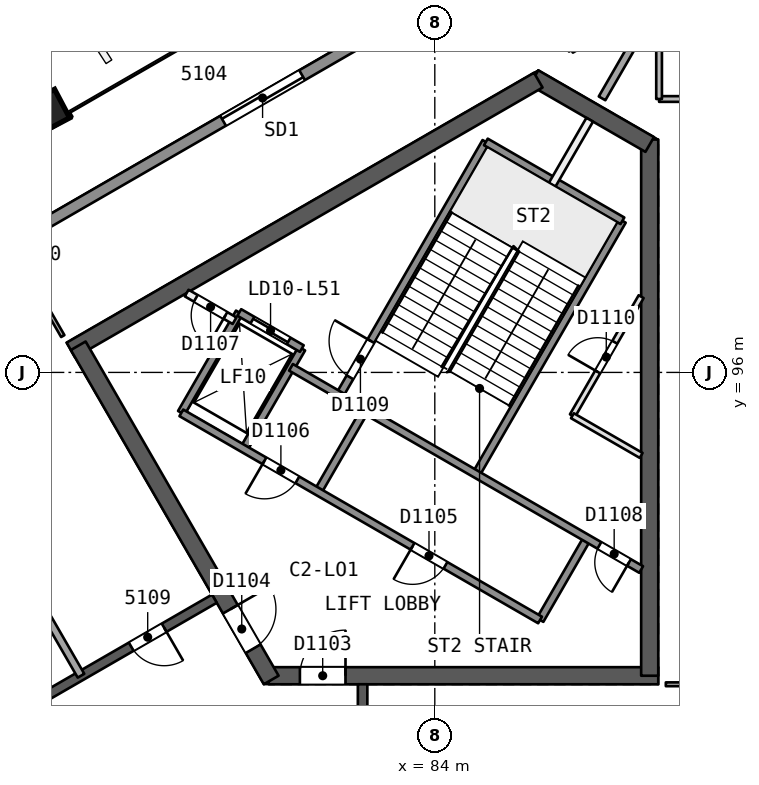
"""IFC4 building model, lengths in metres.
Left out: names, types, materials, properties, quantities, classifications, styles, units other than length and angle.
Written with IfcOpenShell. Run it as: python <this file> out.ifc"""

import sys

from ifc_helpers import new_model, si_unit, direction, frame, frame_2d, origin, origin_2d, place, context, subcontext, project, spatial, rectangle, extrude, element, fill, save


model = new_model("IFC4")
c1 = context("Model", 3, precision=1e-05, world=origin(), true_north=direction((0.0, 1.0)))
c2 = subcontext(c1, "Body", "Model", "MODEL_VIEW")
j1 = project(units=[si_unit("LENGTHUNIT", "METRE"), si_unit("PLANEANGLEUNIT", "RADIAN")], contexts=[c1])
p1 = place(None, origin())
s1 = spatial("IfcSite", under=j1, at=p1, CompositionType="ELEMENT")
p2 = place(p1, origin())
s2 = spatial("IfcBuilding", under=s1, at=p2, CompositionType="ELEMENT")
p3 = place(p2, frame((0.0, 0.0, 209.5)))
s3 = spatial("IfcBuildingStorey", under=s2, at=p3, CompositionType="ELEMENT", Elevation=209.5)
p4 = place(p3, frame((79.63, 88.019, 0.0), z_axis=(0.0, 0.0, 1.0), x_axis=(1.0, 0.0, 0.0)))
e1 = element("IfcWall", 1, at=p4, inside=s3, PredefinedType="SHEAR", context=c2, shape_type="SweptSolid", body=[
    extrude(rectangle(XDim=10.25, YDim=0.45, at=frame_2d((5.125, 0.0))), origin(), (0.0, 0.0, 1.0), 3.7),
])
p5 = place(p4, frame((0.82, 0.0, 0.0)))
e2 = element("IfcOpeningElement", 2, at=p5, cuts=e1, PredefinedType="OPENING", context=c2, shape_type="SweptSolid", body=[
    extrude(rectangle(XDim=1.2, YDim=2.1, at=frame_2d((0.6, 1.05))), frame((0.0, 0.235, 0.0), z_axis=(0.0, -1.0, 0.0), x_axis=(1.0, 0.0, 0.0)), (0.0, 0.0, 1.0), 0.471),
])
p6 = place(p3, frame((89.655, 88.019, 0.0), z_axis=(0.0, 0.0, 1.0), x_axis=(0.0, 1.0, 0.0)))
e3 = element("IfcWall", 3, at=p6, inside=s3, PredefinedType="SHEAR", context=c2, shape_type="SweptSolid", body=[
    extrude(rectangle(XDim=14.108, YDim=0.45, at=frame_2d((7.054, 0.0))), origin(), (0.0, 0.0, 1.0), 3.7),
])
p7 = place(p3, frame((89.655, 101.998, 0.0), z_axis=(0.0, 0.0, 1.0), x_axis=(-0.866042179588, 0.49997094233, 0.0)))
e4 = element("IfcWall", 4, at=p7, inside=s3, PredefinedType="SHEAR", context=c2, shape_type="SweptSolid", body=[
    extrude(rectangle(XDim=3.515, YDim=0.45, at=frame_2d((1.758, 0.0))), origin(), (0.0, 0.0, 1.0), 3.7),
])
p8 = place(p3, frame((86.723, 103.69, 0.0), z_axis=(0.0, 0.0, 1.0), x_axis=(-0.866022713978, -0.500004658852, 0.0)))
e5 = element("IfcWall", 5, at=p8, inside=s3, PredefinedType="SHEAR", context=c2, shape_type="SweptSolid", body=[
    extrude(rectangle(XDim=14.203, YDim=0.45, at=frame_2d((7.102, 0.0))), origin(), (0.0, 0.0, 1.0), 3.7),
])
p9 = place(p3, frame((74.617, 96.701, 0.0), z_axis=(0.0, 0.0, 1.0), x_axis=(0.499994385119, -0.866028645513, 0.0)))
e6 = element("IfcWall", 6, at=p9, inside=s3, PredefinedType="SHEAR", context=c2, shape_type="SweptSolid", body=[
    extrude(rectangle(XDim=10.155, YDim=0.45, at=frame_2d((5.077, 0.0))), origin(), (0.0, 0.0, 1.0), 3.7),
])
p10 = place(p9, frame((8.005, 0.0, 0.0)))
e7 = element("IfcOpeningElement", 7, at=p10, cuts=e6, PredefinedType="OPENING", context=c2, shape_type="SweptSolid", body=[
    extrude(rectangle(XDim=1.2, YDim=2.1, at=frame_2d((0.6, 1.05))), frame((0.0, 0.235, 0.0), z_axis=(0.0, -1.0, 0.0), x_axis=(1.0, 0.0, 0.0)), (0.0, 0.0, 1.0), 0.471),
])
p11 = place(p3, frame((82.1, 72.206, 0.0), z_axis=(0.0, 0.0, 1.0), x_axis=(0.0, 1.0, 0.0)))
e8 = element("IfcWall", 8, at=p11, inside=s3, PredefinedType="SHEAR", context=c2, shape_type="SweptSolid", body=[
    extrude(rectangle(XDim=15.588, YDim=0.25, at=frame_2d((7.794, 0.0))), origin(), (0.0, 0.0, 1.0), 3.3),
])
p12 = place(p11, frame((2.618, 0.0, 0.0)))
e9 = element("IfcOpeningElement", 9, at=p12, cuts=e8, PredefinedType="OPENING", context=c2, shape_type="SweptSolid", body=[
    extrude(rectangle(XDim=1.0, YDim=2.1, at=frame_2d((0.5, 1.05))), frame((0.0, 0.135, 0.0), z_axis=(0.0, -1.0, 0.0), x_axis=(1.0, 0.0, 0.0)), (0.0, 0.0, 1.0), 0.271),
])
p13 = place(p11, frame((8.627, 0.0, 0.0)))
e10 = element("IfcOpeningElement", 10, at=p13, cuts=e8, PredefinedType="OPENING", context=c2, shape_type="SweptSolid", body=[
    extrude(rectangle(XDim=1.1, YDim=2.1, at=frame_2d((0.55, 1.05))), frame((0.0, 0.135, 0.0), z_axis=(0.0, -1.0, 0.0), x_axis=(1.0, 0.0, 0.0)), (0.0, 0.0, 1.0), 0.271),
])
p14 = place(p11, frame((12.282, 0.0, 0.0)))
e11 = element("IfcOpeningElement", 11, at=p14, cuts=e8, PredefinedType="OPENING", context=c2, shape_type="SweptSolid", body=[
    extrude(rectangle(XDim=1.0, YDim=2.1, at=frame_2d((0.5, 1.05))), frame((0.0, 0.135, 0.0), z_axis=(0.0, -1.0, 0.0), x_axis=(1.0, 0.0, 0.0)), (0.0, 0.0, 1.0), 0.271),
])
p15 = place(p3, frame((78.2, 90.046, 0.0), z_axis=(0.0, 0.0, 1.0), x_axis=(-0.866026492143, -0.499998114903, 0.0)))
e12 = element("IfcWall", 12, at=p15, inside=s3, PredefinedType="SHEAR", context=c2, shape_type="SweptSolid", body=[
    extrude(rectangle(XDim=15.588, YDim=0.25, at=frame_2d((7.794, 0.0))), origin(), (0.0, 0.0, 1.0), 3.3),
])
p16 = place(p15, frame((1.527, 0.0, 0.0)))
e13 = element("IfcOpeningElement", 13, at=p16, cuts=e12, PredefinedType="OPENING", context=c2, shape_type="SweptSolid", body=[
    extrude(rectangle(XDim=1.0, YDim=2.1, at=frame_2d((0.5, 1.05))), frame((0.0, 0.135, 0.0), z_axis=(0.0, -1.0, 0.0), x_axis=(1.0, 0.0, 0.0)), (0.0, 0.0, 1.0), 0.271),
])
p17 = place(p15, frame((8.694, 0.0, 0.0)))
e14 = element("IfcOpeningElement", 14, at=p17, cuts=e12, PredefinedType="OPENING", context=c2, shape_type="SweptSolid", body=[
    extrude(rectangle(XDim=1.1, YDim=2.1, at=frame_2d((0.55, 1.05))), frame((0.0, 0.135, 0.0), z_axis=(0.0, -1.0, 0.0), x_axis=(1.0, 0.0, 0.0)), (0.0, 0.0, 1.0), 0.271),
])
p18 = place(p15, frame((13.062, 0.0, 0.0)))
e15 = element("IfcOpeningElement", 15, at=p18, cuts=e12, PredefinedType="OPENING", context=c2, shape_type="SweptSolid", body=[
    extrude(rectangle(XDim=1.0, YDim=2.1, at=frame_2d((0.5, 1.05))), frame((0.0, 0.135, 0.0), z_axis=(0.0, -1.0, 0.0), x_axis=(1.0, 0.0, 0.0)), (0.0, 0.0, 1.0), 0.271),
])
p19 = place(p3, frame((73.816, 102.902, 0.0), z_axis=(0.000857578916, -0.022824792675, 0.999739112668), x_axis=(0.866060437909, 0.499825470945, 0.010668480848)))
e16 = element("IfcColumn", 16, at=p19, inside=s3, PredefinedType="COLUMN", context=c2, shape_type="SweptSolid", body=[
    extrude(rectangle(XDim=0.85, YDim=0.85, at=origin_2d()), origin(), (0.0, 0.0, 1.0), 3.701),
])
p20 = place(p3, frame((92.727, 87.794, 0.0), z_axis=(0.0, 0.0, 1.0), x_axis=(-1.0, 0.0, 0.0)))
e17 = element("IfcWall", 17, at=p20, inside=s3, PredefinedType="PARTITIONING", context=c2, shape_type="SweptSolid", body=[
    extrude(rectangle(XDim=2.648, YDim=0.1, at=frame_2d((1.324, 0.0))), origin(), (0.0, 0.0, 1.0), 3.3),
])
p21 = place(p20, frame((0.874, 0.0, 0.0)))
e18 = element("IfcOpeningElement", 18, at=p21, cuts=e17, PredefinedType="OPENING", context=c2, shape_type="SweptSolid", body=[
    extrude(rectangle(XDim=0.9, YDim=2.1, at=frame_2d((0.45, 1.05))), frame((0.0, 0.061, 0.0), z_axis=(0.0, -1.0, 0.0), x_axis=(1.0, 0.0, 0.0)), (0.0, 0.0, 1.0), 0.121),
])
p22 = place(p3, frame((92.727, 103.194, 0.0), z_axis=(0.0, 0.0, 1.0), x_axis=(-1.0, 0.0, 0.0)))
e19 = element("IfcWall", 19, at=p22, inside=s3, PredefinedType="PARTITIONING", context=c2, shape_type="SweptSolid", body=[
    extrude(rectangle(XDim=2.825, YDim=0.15, at=frame_2d((1.413, 0.0))), origin(), (0.0, 0.0, 1.0), 3.3),
])
p23 = place(p22, frame((1.013, 0.0, 0.0)))
e20 = element("IfcOpeningElement", 20, at=p23, cuts=e19, PredefinedType="OPENING", context=c2, shape_type="SweptSolid", body=[
    extrude(rectangle(XDim=0.8, YDim=2.1, at=frame_2d((0.4, 1.05))), frame((0.0, 0.085, 0.0), z_axis=(0.0, -1.0, 0.0), x_axis=(1.0, 0.0, 0.0)), (0.0, 0.0, 1.0), 0.171),
])
p24 = place(p3, frame((89.902, 103.194, 0.0), z_axis=(0.0, 0.0, 1.0), x_axis=(0.0, 1.0, 0.0)))
e21 = element("IfcWall", 21, at=p24, inside=s3, PredefinedType="PARTITIONING", context=c2, shape_type="SweptSolid", body=[
    extrude(rectangle(XDim=2.6, YDim=0.15, at=frame_2d((1.3, 0.0))), origin(), (0.0, 0.0, 1.0), 3.3),
])
p25 = place(p3, frame((90.524, 106.889, 0.0), z_axis=(0.0, 0.0, 1.0), x_axis=(-0.499991184371, -0.86603049343, 0.0)))
e22 = element("IfcWall", 22, at=p25, inside=s3, PredefinedType="PARTITIONING", context=c2, shape_type="SweptSolid", body=[
    extrude(rectangle(XDim=4.247, YDim=0.2, at=frame_2d((2.123, 0.0))), origin(), (0.0, 0.0, 1.0), 3.3),
])
p26 = place(p3, frame((74.21, 96.956, 0.0), z_axis=(0.0, 0.0, 1.0), x_axis=(-0.49995654735, 0.86605048973, 0.0)))
e23 = element("IfcWall", 23, at=p26, inside=s3, PredefinedType="PARTITIONING", context=c2, shape_type="SweptSolid", body=[
    extrude(rectangle(XDim=2.648, YDim=0.1, at=frame_2d((1.324, 0.0))), origin(), (0.0, 0.0, 1.0), 3.3),
])
p27 = place(p26, frame((0.874, 0.0, 0.0)))
e24 = element("IfcOpeningElement", 24, at=p27, cuts=e23, PredefinedType="OPENING", context=c2, shape_type="SweptSolid", body=[
    extrude(rectangle(XDim=0.9, YDim=2.1, at=frame_2d((0.45, 1.05))), frame((0.0, 0.061, 0.0), z_axis=(0.0, -1.0, 0.0), x_axis=(1.0, 0.0, 0.0)), (0.0, 0.0, 1.0), 0.121),
])
p28 = place(p3, frame((69.376, 97.223, 0.0), z_axis=(0.0, 0.0, 1.0), x_axis=(0.499993571489, -0.866029115255, 0.0)))
e25 = element("IfcWall", 25, at=p28, inside=s3, PredefinedType="PARTITIONING", context=c2, shape_type="SweptSolid", body=[
    extrude(rectangle(XDim=10.627, YDim=0.2, at=frame_2d((5.313, 0.0))), origin(), (0.0, 0.0, 1.0), 3.3),
])
p29 = place(p3, frame((89.848, 105.779, 0.0), z_axis=(0.0, 0.0, 1.0), x_axis=(-0.866021400173, -0.500006934395, 0.0)))
e26 = element("IfcWall", 26, at=p29, inside=s3, PredefinedType="PARTITIONING", context=c2, shape_type="SweptSolid", body=[
    extrude(rectangle(XDim=2.6, YDim=0.15, at=frame_2d((1.3, 0.0))), origin(), (0.0, 0.0, 1.0), 3.3),
])
p30 = place(p3, frame((43.802, 82.63, 0.0), z_axis=(0.0, 0.0, 1.0), x_axis=(0.866026224187, 0.499998579018, 0.0)))
e27 = element("IfcWall", 27, at=p30, inside=s3, PredefinedType="SOLIDWALL", context=c2, shape_type="SweptSolid", body=[
    extrude(rectangle(XDim=51.406, YDim=0.3, at=frame_2d((25.703, 0.0))), origin(), (0.0, 0.0, 1.0), 3.3),
])
p31 = place(p30, frame((24.503, 0.0, 0.0)))
e28 = element("IfcOpeningElement", 28, at=p31, cuts=e27, PredefinedType="OPENING", context=c2, shape_type="SweptSolid", body=[
    extrude(rectangle(XDim=2.4, YDim=2.4, at=frame_2d((1.2, 1.2))), frame((0.0, 0.161, 0.0), z_axis=(0.0, -1.0, 0.0), x_axis=(1.0, 0.0, 0.0)), (0.0, 0.0, 1.0), 0.321),
])
p32 = place(p30, frame((30.271, 0.0, 0.0)))
e29 = element("IfcOpeningElement", 29, at=p32, cuts=e27, PredefinedType="OPENING", context=c2, shape_type="SweptSolid", body=[
    extrude(rectangle(XDim=2.4, YDim=2.4, at=frame_2d((1.2, 1.2))), frame((0.0, 0.161, 0.0), z_axis=(0.0, -1.0, 0.0), x_axis=(1.0, 0.0, 0.0)), (0.0, 0.0, 1.0), 0.321),
])
p33 = place(p30, frame((39.983, 0.0, 0.0)))
e30 = element("IfcOpeningElement", 30, at=p33, cuts=e27, PredefinedType="OPENING", context=c2, shape_type="SweptSolid", body=[
    extrude(rectangle(XDim=2.4, YDim=2.4, at=frame_2d((1.2, 1.2))), frame((0.0, 0.161, 0.0), z_axis=(0.0, -1.0, 0.0), x_axis=(1.0, 0.0, 0.0)), (0.0, 0.0, 1.0), 0.321),
])
p34 = place(p30, frame((18.736, 0.0, 0.0)))
e31 = element("IfcOpeningElement", 31, at=p34, cuts=e27, PredefinedType="OPENING", context=c2, shape_type="SweptSolid", body=[
    extrude(rectangle(XDim=2.4, YDim=2.4, at=frame_2d((1.2, 1.2))), frame((0.0, 0.161, 0.0), z_axis=(0.0, -1.0, 0.0), x_axis=(1.0, 0.0, 0.0)), (0.0, 0.0, 1.0), 0.321),
])
p35 = place(p30, frame((9.0, 0.0, 0.0)))
e32 = element("IfcOpeningElement", 32, at=p35, cuts=e27, PredefinedType="OPENING", context=c2, shape_type="SweptSolid", body=[
    extrude(rectangle(XDim=2.4, YDim=2.4, at=frame_2d((1.2, 1.2))), frame((0.0, 0.161, 0.0), z_axis=(0.0, -1.0, 0.0), x_axis=(1.0, 0.0, 0.0)), (0.0, 0.0, 1.0), 0.321),
])
p36 = place(p3, frame((86.77, 89.486, 0.0), z_axis=(0.0, 0.0, 1.0), x_axis=(0.499961042966, 0.86604789447, 0.0)))
e33 = element("IfcWall", 33, at=p36, inside=s3, PredefinedType="SOLIDWALL", context=c2, shape_type="SweptSolid", body=[
    extrude(rectangle(XDim=2.48, YDim=0.2, at=frame_2d((1.24, 0.0))), origin(), (0.0, 0.0, 1.0), 3.3),
])
p37 = place(p3, frame((87.621, 94.86, 0.0), z_axis=(0.0, 0.0, 1.0), x_axis=(0.499993116331, 0.866029378036, 0.0)))
e34 = element("IfcWall", 34, at=p37, inside=s3, PredefinedType="PARTITIONING", context=c2, shape_type="SweptSolid", body=[
    extrude(rectangle(XDim=3.618, YDim=0.15, at=frame_2d((1.809, 0.0))), origin(), (0.0, 0.0, 1.0), 3.3),
])
p38 = place(p37, frame((1.332, 0.0, 0.0)))
e35 = element("IfcOpeningElement", 35, at=p38, cuts=e34, PredefinedType="OPENING", context=c2, shape_type="SweptSolid", body=[
    extrude(rectangle(XDim=0.9, YDim=2.1, at=frame_2d((0.45, 1.05))), frame((0.0, 0.085, 0.0), z_axis=(0.0, -1.0, 0.0), x_axis=(1.0, 0.0, 0.0)), (0.0, 0.0, 1.0), 0.171),
])
p39 = place(p3, frame((85.087, 93.321, 0.0), z_axis=(0.0, 0.0, 1.0), x_axis=(0.500019787375, 0.866013979237, 0.0)))
e36 = element("IfcWall", 36, at=p39, inside=s3, PredefinedType="SOLIDWALL", context=c2, shape_type="SweptSolid", body=[
    extrude(rectangle(XDim=7.7, YDim=0.2, at=frame_2d((3.85, 0.0))), origin(), (0.0, 0.0, 1.0), 3.3),
])
p40 = place(p3, frame((87.09, 100.94, 0.0), z_axis=(0.0, 0.0, 1.0), x_axis=(0.500011643316, 0.866018681408, 0.0)))
e37 = element("IfcWall", 37, at=p40, inside=s3, PredefinedType="PARTITIONING", context=c2, shape_type="SweptSolid", body=[
    extrude(rectangle(XDim=1.973, YDim=0.2, at=frame_2d((0.987, 0.0))), origin(), (0.0, 0.0, 1.0), 3.3),
])
p41 = place(p3, frame((80.924, 92.861, 0.0), z_axis=(0.0, 0.0, 1.0), x_axis=(0.499961042966, 0.86604789447, 0.0)))
e38 = element("IfcWall", 38, at=p41, inside=s3, PredefinedType="SOLIDWALL", context=c2, shape_type="SweptSolid", body=[
    extrude(rectangle(XDim=2.48, YDim=0.2, at=frame_2d((1.24, 0.0))), origin(), (0.0, 0.0, 1.0), 3.3),
])
p42 = place(p3, frame((81.493, 95.396, 0.0), z_axis=(0.0, 0.0, 1.0), x_axis=(0.500006057782, 0.866021906294, 0.0)))
e39 = element("IfcWall", 39, at=p42, inside=s3, PredefinedType="SOLIDWALL", context=c2, shape_type="SweptSolid", body=[
    extrude(rectangle(XDim=7.7, YDim=0.2, at=frame_2d((3.85, 0.0))), origin(), (0.0, 0.0, 1.0), 3.3),
])
p43 = place(p42, frame((0.55, 0.0, 0.0)))
e40 = element("IfcOpeningElement", 40, at=p43, cuts=e39, PredefinedType="OPENING", context=c2, shape_type="SweptSolid", body=[
    extrude(rectangle(XDim=1.1, YDim=2.1, at=frame_2d((0.55, 1.05))), frame((0.0, 0.11, 0.0), z_axis=(0.0, -1.0, 0.0), x_axis=(1.0, 0.0, 0.0)), (0.0, 0.0, 1.0), 0.221),
])
for number, where, z_axis, x_axis in (
    (41, (78.976, 93.986, 0.0), (0.0, 0.0, 1.0), (0.5, 0.866, 0.0)),
    (42, (77.33, 94.936, 0.0), (0.0, 0.0, 1.0), (0.5, 0.866, 0.0)),
):
    element("IfcWall", number, at=place(p3, frame(where, z_axis=z_axis, x_axis=x_axis)), inside=s3, PredefinedType="SOLIDWALL", context=c2, shape_type="SweptSolid", body=[
        extrude(rectangle(XDim=3.05, YDim=0.2, at=frame_2d((1.525, 0.0))), origin(), (0.0, 0.0, 1.0), 3.3),
    ])
p44 = place(p3, frame((86.77, 89.486, 0.0), z_axis=(0.0, 0.0, 1.0), x_axis=(-0.86601811187, 0.500012629753, 0.0)))
e43 = element("IfcWall", 43, at=p44, inside=s3, PredefinedType="SOLIDWALL", context=c2, shape_type="SweptSolid", body=[
    extrude(rectangle(XDim=10.9, YDim=0.2, at=frame_2d((5.45, 0.0))), origin(), (0.0, 0.0, 1.0), 3.3),
])
p45 = place(p44, frame((2.875, 0.0, 0.0)))
e44 = element("IfcOpeningElement", 44, at=p45, cuts=e43, PredefinedType="OPENING", context=c2, shape_type="SweptSolid", body=[
    extrude(rectangle(XDim=1.0, YDim=2.1, at=frame_2d((0.5, 1.05))), frame((0.0, 0.11, 0.0), z_axis=(0.0, -1.0, 0.0), x_axis=(1.0, 0.0, 0.0)), (0.0, 0.0, 1.0), 0.221),
])
p46 = place(p44, frame((7.375, 0.0, 0.0)))
e45 = element("IfcOpeningElement", 45, at=p46, cuts=e43, PredefinedType="OPENING", context=c2, shape_type="SweptSolid", body=[
    extrude(rectangle(XDim=1.0, YDim=2.1, at=frame_2d((0.5, 1.05))), frame((0.0, 0.11, 0.0), z_axis=(0.0, -1.0, 0.0), x_axis=(1.0, 0.0, 0.0)), (0.0, 0.0, 1.0), 0.221),
])
p47 = place(p3, frame((89.43, 90.814, 0.0), z_axis=(0.0, 0.0, 1.0), x_axis=(-0.866018983788, 0.500011119594, 0.0)))
e46 = element("IfcWall", 46, at=p47, inside=s3, PredefinedType="SOLIDWALL", context=c2, shape_type="SweptSolid", body=[
    extrude(rectangle(XDim=10.64, YDim=0.2, at=frame_2d((5.32, 0.0))), origin(), (0.0, 0.0, 1.0), 3.3),
])
p48 = place(p47, frame((0.37, 0.0, 0.0)))
e47 = element("IfcOpeningElement", 47, at=p48, cuts=e46, PredefinedType="OPENING", context=c2, shape_type="SweptSolid", body=[
    extrude(rectangle(XDim=0.9, YDim=2.1, at=frame_2d((0.45, 1.05))), frame((0.0, 0.11, 0.0), z_axis=(0.0, -1.0, 0.0), x_axis=(1.0, 0.0, 0.0)), (0.0, 0.0, 1.0), 0.221),
])
p49 = place(p3, frame((78.73, 97.361, 0.0), z_axis=(0.0, 0.0, 1.0), x_axis=(-0.866045896294, 0.499964504253, 0.0)))
e48 = element("IfcWall", 48, at=p49, inside=s3, PredefinedType="PARTITIONING", context=c2, shape_type="SweptSolid", body=[
    extrude(rectangle(XDim=1.455, YDim=0.2, at=frame_2d((0.728, 0.0))), origin(), (0.0, 0.0, 1.0), 3.3),
])
p50 = place(p49, frame((0.278, 0.0, 0.0)))
e49 = element("IfcOpeningElement", 49, at=p50, cuts=e48, PredefinedType="OPENING", context=c2, shape_type="SweptSolid", body=[
    extrude(rectangle(XDim=0.9, YDim=2.1, at=frame_2d((0.45, 1.05))), frame((0.0, 0.11, 0.0), z_axis=(0.0, -1.0, 0.0), x_axis=(1.0, 0.0, 0.0)), (0.0, 0.0, 1.0), 0.221),
])
p51 = place(p3, frame((80.5, 96.627, 0.0), z_axis=(0.0, 0.0, 1.0), x_axis=(-0.86601224135, 0.500022797313, 0.0)))
e50 = element("IfcWall", 50, at=p51, inside=s3, PredefinedType="SOLIDWALL", context=c2, shape_type="SweptSolid", body=[
    extrude(rectangle(XDim=1.9, YDim=0.2, at=frame_2d((0.95, 0.0))), origin(), (0.0, 0.0, 1.0), 3.3),
])
p52 = place(p51, frame((0.4, 0.0, 0.0)))
e51 = element("IfcOpeningElement", 51, at=p52, cuts=e50, PredefinedType="OPENING", context=c2, shape_type="SweptSolid", body=[
    extrude(rectangle(XDim=1.1, YDim=2.1, at=frame_2d((0.55, 1.05))), frame((0.0, 0.11, 0.0), z_axis=(0.0, -1.0, 0.0), x_axis=(1.0, 0.0, 0.0)), (0.0, 0.0, 1.0), 0.221),
])
p53 = place(p3, frame((89.43, 93.816, 0.0), z_axis=(0.0, 0.0, 1.0), x_axis=(-0.866004557827, 0.500036104519, 0.0)))
e52 = element("IfcWall", 52, at=p53, inside=s3, PredefinedType="PARTITIONING", context=c2, shape_type="SweptSolid", body=[
    extrude(rectangle(XDim=2.089, YDim=0.15, at=frame_2d((1.044, 0.0))), origin(), (0.0, 0.0, 1.0), 3.3),
])
p54 = place(p3, frame((88.937, 99.99, 0.0), z_axis=(0.0, 0.0, 1.0), x_axis=(-0.866004344652, 0.500036473714, 0.0)))
e53 = element("IfcWall", 53, at=p54, inside=s3, PredefinedType="SOLIDWALL", context=c2, shape_type="SweptSolid", body=[
    extrude(rectangle(XDim=4.15, YDim=0.2, at=frame_2d((2.075, 0.0))), origin(), (0.0, 0.0, 1.0), 3.3),
])
p55 = place(p16, origin())
e54 = element("IfcDoor", 54, at=p55, inside=s3, OperationType="SINGLE_SWING_LEFT", PredefinedType="NOTDEFINED", context=c2, shape_type="SweptSolid", body=[
    extrude(rectangle(XDim=1.0, YDim=2.1, at=frame_2d((0.5, 1.05))), frame((0.0, 0.025, 0.0), z_axis=(0.0, -1.0, 0.0), x_axis=(1.0, 0.0, 0.0)), (0.0, 0.0, 1.0), 0.05),
])
fill(e13, e54)
p56 = place(p33, origin())
e55 = element("IfcDoor", 55, at=p56, inside=s3, OperationType="SLIDING_TO_LEFT", PredefinedType="NOTDEFINED", context=c2, shape_type="SweptSolid", body=[
    extrude(rectangle(XDim=2.4, YDim=2.4, at=frame_2d((1.2, 1.2))), frame((0.0, 0.025, 0.0), z_axis=(0.0, -1.0, 0.0), x_axis=(1.0, 0.0, 0.0)), (0.0, 0.0, 1.0), 0.05),
])
fill(e30, e55)
p57 = place(p5, origin())
e56 = element("IfcDoor", 56, at=p57, inside=s3, OperationType="SINGLE_SWING_RIGHT", PredefinedType="NOTDEFINED", context=c2, shape_type="SweptSolid", body=[
    extrude(rectangle(XDim=1.2, YDim=2.1, at=frame_2d((0.6, 1.05))), frame((0.0, 0.025, 0.0), z_axis=(0.0, -1.0, 0.0), x_axis=(1.0, 0.0, 0.0)), (0.0, 0.0, 1.0), 0.05),
])
fill(e2, e56)
p58 = place(p10, origin())
e57 = element("IfcDoor", 57, at=p58, inside=s3, OperationType="SINGLE_SWING_LEFT", PredefinedType="NOTDEFINED", context=c2, shape_type="SweptSolid", body=[
    extrude(rectangle(XDim=1.2, YDim=2.1, at=frame_2d((0.6, 1.05))), frame((0.0, 0.025, 0.0), z_axis=(0.0, -1.0, 0.0), x_axis=(1.0, 0.0, 0.0)), (0.0, 0.0, 1.0), 0.05),
])
fill(e7, e57)
p59 = place(p52, origin())
e58 = element("IfcDoor", 58, at=p59, inside=s3, OperationType="SLIDING_TO_RIGHT", PredefinedType="NOTDEFINED", context=c2, shape_type="SweptSolid", body=[
    extrude(rectangle(XDim=1.1, YDim=2.1, at=frame_2d((0.55, 1.05))), frame((0.0, 0.025, 0.0), z_axis=(0.0, -1.0, 0.0), x_axis=(1.0, 0.0, 0.0)), (0.0, 0.0, 1.0), 0.05),
])
fill(e51, e58)
p60 = place(p45, origin())
e59 = element("IfcDoor", 59, at=p60, inside=s3, OperationType="SINGLE_SWING_RIGHT", PredefinedType="NOTDEFINED", context=c2, shape_type="SweptSolid", body=[
    extrude(rectangle(XDim=1.0, YDim=2.1, at=frame_2d((0.5, 1.05))), frame((0.0, 0.025, 0.0), z_axis=(0.0, -1.0, 0.0), x_axis=(1.0, 0.0, 0.0)), (0.0, 0.0, 1.0), 0.05),
])
fill(e44, e59)
p61 = place(p46, origin())
e60 = element("IfcDoor", 60, at=p61, inside=s3, OperationType="SINGLE_SWING_RIGHT", PredefinedType="NOTDEFINED", context=c2, shape_type="SweptSolid", body=[
    extrude(rectangle(XDim=1.0, YDim=2.1, at=frame_2d((0.5, 1.05))), frame((0.0, 0.025, 0.0), z_axis=(0.0, -1.0, 0.0), x_axis=(1.0, 0.0, 0.0)), (0.0, 0.0, 1.0), 0.05),
])
fill(e45, e60)
p62 = place(p50, origin())
e61 = element("IfcDoor", 61, at=p62, inside=s3, OperationType="SINGLE_SWING_LEFT", PredefinedType="NOTDEFINED", context=c2, shape_type="SweptSolid", body=[
    extrude(rectangle(XDim=0.9, YDim=2.1, at=frame_2d((0.45, 1.05))), frame((0.0, 0.025, 0.0), z_axis=(0.0, -1.0, 0.0), x_axis=(1.0, 0.0, 0.0)), (0.0, 0.0, 1.0), 0.05),
])
fill(e49, e61)
p63 = place(p48, origin())
e62 = element("IfcDoor", 62, at=p63, inside=s3, OperationType="SINGLE_SWING_LEFT", PredefinedType="NOTDEFINED", context=c2, shape_type="SweptSolid", body=[
    extrude(rectangle(XDim=0.9, YDim=2.1, at=frame_2d((0.45, 1.05))), frame((0.0, 0.025, 0.0), z_axis=(0.0, -1.0, 0.0), x_axis=(1.0, 0.0, 0.0)), (0.0, 0.0, 1.0), 0.05),
])
fill(e47, e62)
p64 = place(p43, origin())
e63 = element("IfcDoor", 63, at=p64, inside=s3, OperationType="SINGLE_SWING_RIGHT", PredefinedType="NOTDEFINED", context=c2, shape_type="SweptSolid", body=[
    extrude(rectangle(XDim=1.1, YDim=2.1, at=frame_2d((0.55, 1.05))), frame((0.0, 0.025, 0.0), z_axis=(0.0, -1.0, 0.0), x_axis=(1.0, 0.0, 0.0)), (0.0, 0.0, 1.0), 0.05),
])
fill(e40, e63)
p65 = place(p38, origin())
e64 = element("IfcDoor", 64, at=p65, inside=s3, OperationType="SINGLE_SWING_LEFT", PredefinedType="NOTDEFINED", context=c2, shape_type="SweptSolid", body=[
    extrude(rectangle(XDim=0.9, YDim=2.1, at=frame_2d((0.45, 1.05))), frame((0.0, 0.025, 0.0), z_axis=(0.0, -1.0, 0.0), x_axis=(1.0, 0.0, 0.0)), (0.0, 0.0, 1.0), 0.05),
])
fill(e35, e64)
save(model, sys.argv[1])
